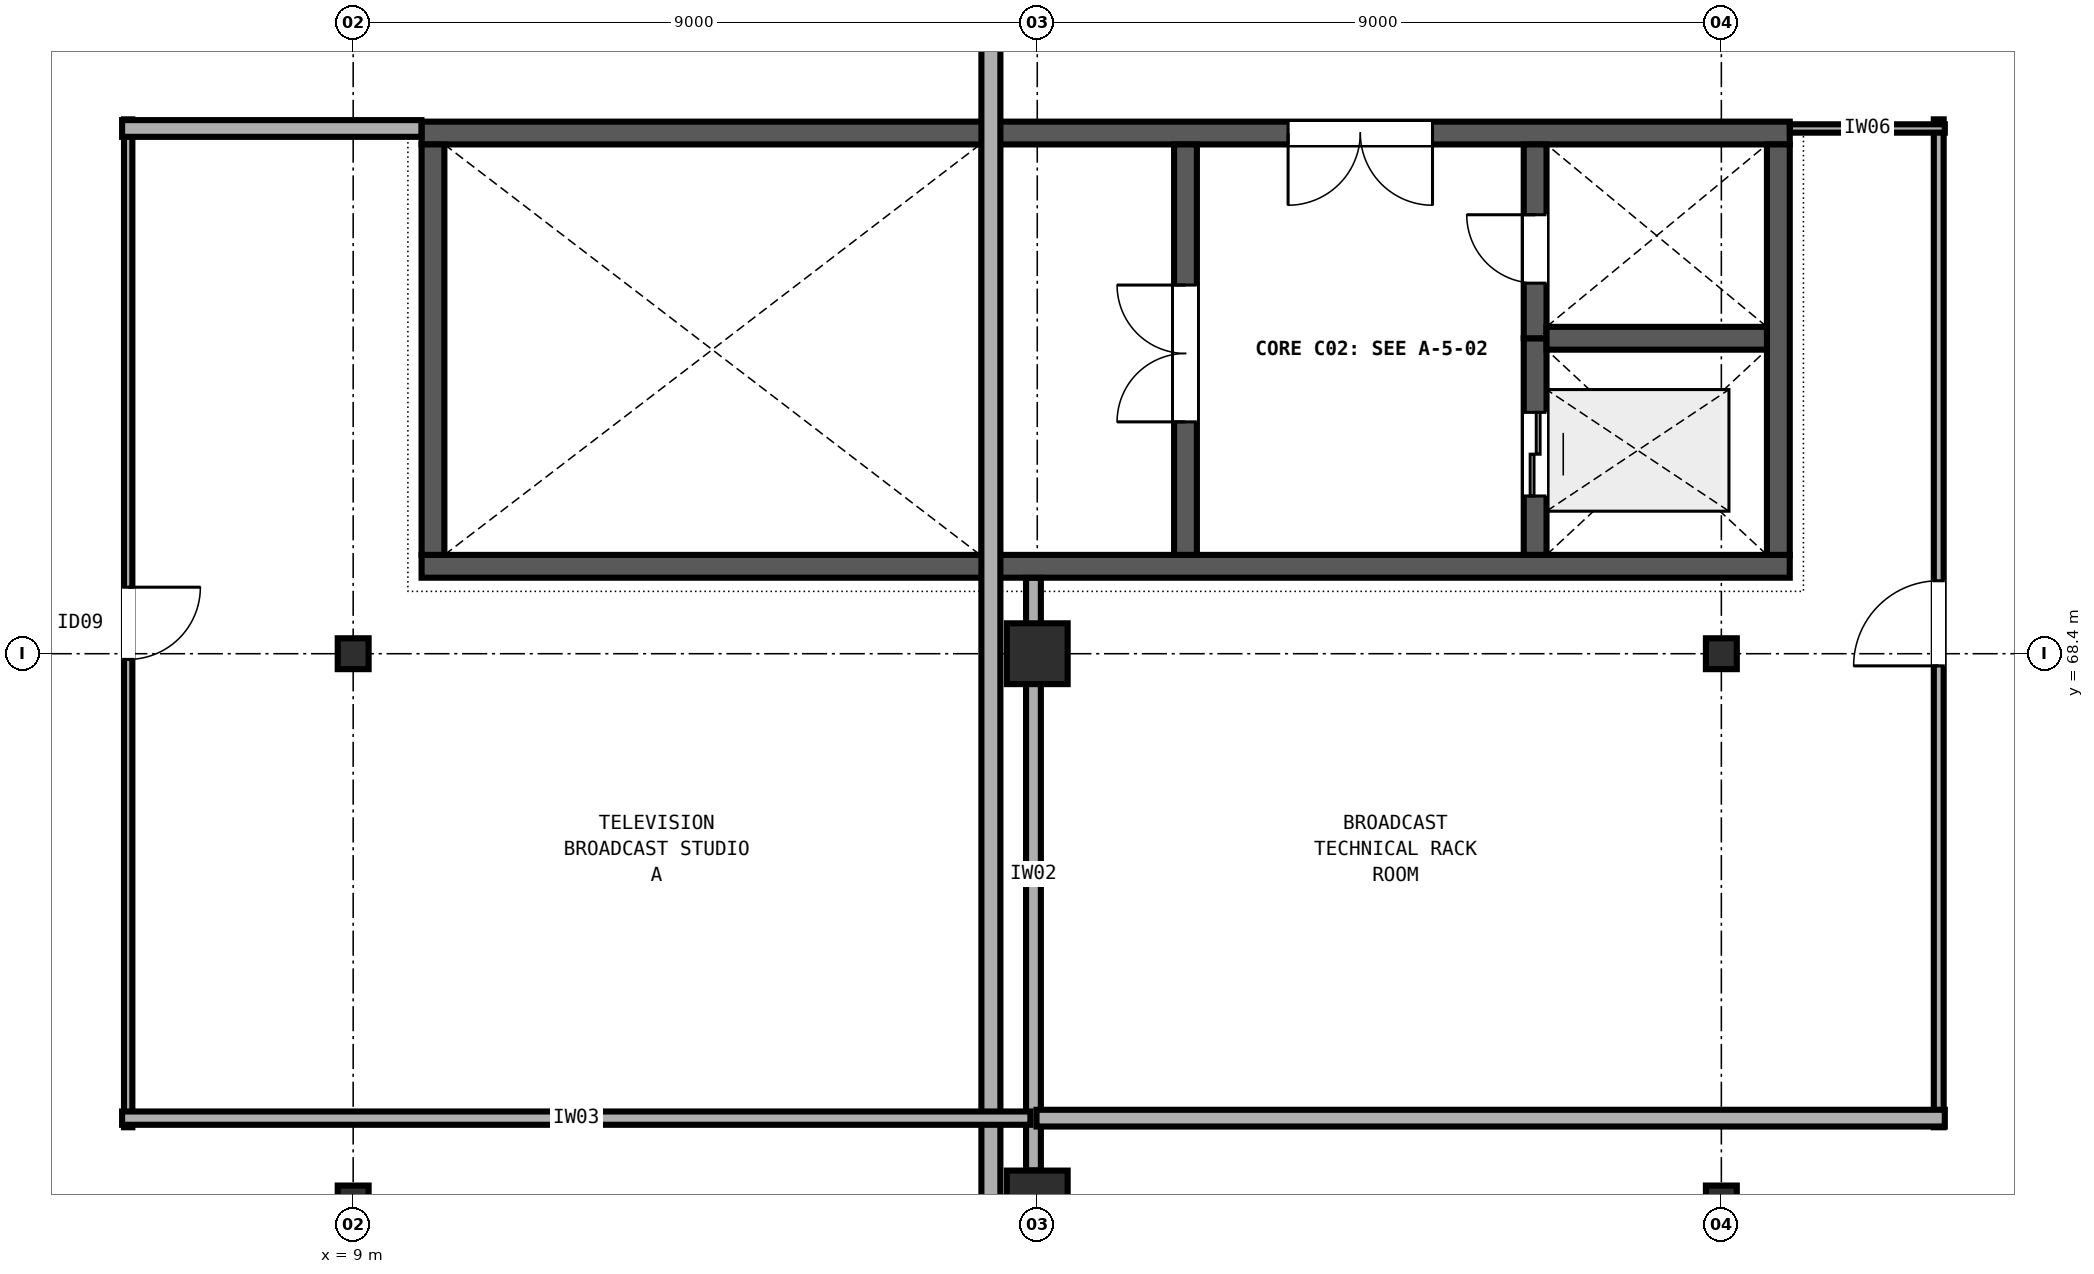
"""IFC4 building model, lengths in metres.
Left out: names, types, materials, properties, quantities, classifications, styles, units other than length and angle.
Written with IfcOpenShell. Run it as: python <this file> out.ifc"""

import sys

from ifc_helpers import new_model, si_unit, direction, frame, frame_2d, origin, origin_2d, place, context, subcontext, project, spatial, rectangle, hollow_circle, extrude, element, fill, save


model = new_model("IFC4")
c1 = context("Model", 3, precision=1e-05, world=origin(), true_north=direction((0.0, 1.0)))
c2 = subcontext(c1, "Body", "Model", "MODEL_VIEW")
j1 = project(units=[si_unit("LENGTHUNIT", "METRE"), si_unit("PLANEANGLEUNIT", "RADIAN")], contexts=[c1])
p1 = place(None, origin())
s1 = spatial("IfcSite", under=j1, at=p1, CompositionType="ELEMENT")
p2 = place(p1, origin())
s2 = spatial("IfcBuilding", under=s1, at=p2, CompositionType="ELEMENT")
p3 = place(p2, frame((0.0, 0.0, 24.0)))
s3 = spatial("IfcBuildingStorey", under=s2, at=p3, CompositionType="ELEMENT", Elevation=24.0)
for number, where, z_axis, x_axis in (
    (1, (9.0, 61.2, 0.0), (0.0, 0.0, 1.0), (1.0, 0.0, 0.0)),
    (2, (9.0, 68.4, 0.0), (0.0, 0.0, 1.0), (1.0, 0.0, 0.0)),
):
    element("IfcColumn", number, at=place(p3, frame(where, z_axis=z_axis, x_axis=x_axis)), inside=s3, PredefinedType="COLUMN", context=c2, shape_type="SweptSolid", body=[
        extrude(hollow_circle(Radius=0.203, WallThickness=0.014, at=origin_2d()), origin(), (0.0, 0.0, 1.0), 4.8),
    ])
for number, where, z_axis, x_axis in (
    (3, (18.0, 61.2, 0.0), (0.0, 0.0, 1.0), (1.0, 0.0, 0.0)),
    (4, (18.0, 68.4, 0.0), (0.0, 0.0, 1.0), (1.0, 0.0, 0.0)),
):
    element("IfcColumn", number, at=place(p3, frame(where, z_axis=z_axis, x_axis=x_axis)), inside=s3, PredefinedType="COLUMN", context=c2, shape_type="SweptSolid", body=[
        extrude(rectangle(XDim=0.8, YDim=0.8, at=origin_2d()), origin(), (0.0, 0.0, 1.0), 4.8),
    ])
for number, where, z_axis, x_axis in (
    (5, (27.0, 61.2, 0.0), (0.0, 0.0, 1.0), (1.0, 0.0, 0.0)),
    (6, (27.0, 68.4, 0.0), (0.0, 0.0, 1.0), (1.0, 0.0, 0.0)),
):
    element("IfcColumn", number, at=place(p3, frame(where, z_axis=z_axis, x_axis=x_axis)), inside=s3, PredefinedType="COLUMN", context=c2, shape_type="SweptSolid", body=[
        extrude(hollow_circle(Radius=0.203, WallThickness=0.014, at=origin_2d()), origin(), (0.0, 0.0, 1.0), 4.8),
    ])
p4 = place(p3, frame((9.9, 69.55, 0.0), z_axis=(0.0, 0.0, 1.0), x_axis=(1.0, 0.0, 0.0)))
e7 = element("IfcWall", 7, at=p4, inside=s3, PredefinedType="SHEAR", context=c2, shape_type="SweptSolid", body=[
    extrude(rectangle(XDim=18.0, YDim=0.3, at=frame_2d((9.0, 0.0))), origin(), (0.0, 0.0, 1.0), 4.56),
])
p5 = place(p3, frame((27.9, 75.25, 0.0), z_axis=(0.0, 0.0, 1.0), x_axis=(-1.0, 0.0, 0.0)))
e8 = element("IfcWall", 8, at=p5, inside=s3, PredefinedType="SHEAR", context=c2, shape_type="SweptSolid", body=[
    extrude(rectangle(XDim=18.0, YDim=0.3, at=frame_2d((9.0, 0.0))), origin(), (0.0, 0.0, 1.0), 4.56),
])
p6 = place(p5, frame((4.7, 0.0, 0.0)))
e9 = element("IfcOpeningElement", 9, at=p6, cuts=e8, PredefinedType="OPENING", context=c2, shape_type="SweptSolid", body=[
    extrude(rectangle(XDim=1.9, YDim=2.25, at=frame_2d((0.95, 1.125))), frame((0.0, 0.16, 0.0), z_axis=(0.0, -1.0, 0.0), x_axis=(1.0, 0.0, 0.0)), (0.0, 0.0, 1.0), 0.32),
])
for number, where, z_axis, x_axis in (
    (10, (10.05, 75.1, 0.0), (0.0, 0.0, 1.0), (0.0, -1.0, 0.0)),
    (11, (27.75, 69.7, 0.0), (0.0, 0.0, 1.0), (0.0, 1.0, 0.0)),
):
    element("IfcWall", number, at=place(p3, frame(where, z_axis=z_axis, x_axis=x_axis)), inside=s3, PredefinedType="SHEAR", context=c2, shape_type="SweptSolid", body=[
        extrude(rectangle(XDim=5.4, YDim=0.3, at=frame_2d((2.7, 0.0))), origin(), (0.0, 0.0, 1.0), 4.56),
    ])
p7 = place(p3, frame((19.95, 69.7, 0.0), z_axis=(0.0, 0.0, 1.0), x_axis=(0.0, 1.0, 0.0)))
e12 = element("IfcWall", 12, at=p7, inside=s3, PredefinedType="SHEAR", context=c2, shape_type="SweptSolid", body=[
    extrude(rectangle(XDim=5.4, YDim=0.3, at=frame_2d((2.7, 0.0))), origin(), (0.0, 0.0, 1.0), 4.56),
])
p8 = place(p7, frame((1.75, 0.0, 0.0)))
e13 = element("IfcOpeningElement", 13, at=p8, cuts=e12, PredefinedType="OPENING", context=c2, shape_type="SweptSolid", body=[
    extrude(rectangle(XDim=1.8, YDim=2.25, at=frame_2d((0.9, 1.125))), frame((0.0, 0.16, 0.0), z_axis=(0.0, -1.0, 0.0), x_axis=(1.0, 0.0, 0.0)), (0.0, 0.0, 1.0), 0.32),
])
p9 = place(p3, frame((24.55, 69.7, 0.0), z_axis=(0.0, 0.0, 1.0), x_axis=(0.0, 1.0, 0.0)))
e14 = element("IfcWall", 14, at=p9, inside=s3, PredefinedType="SHEAR", context=c2, shape_type="SweptSolid", body=[
    extrude(rectangle(XDim=2.85, YDim=0.3, at=frame_2d((1.425, 0.0))), origin(), (0.0, 0.0, 1.0), 4.56),
])
p10 = place(p9, frame((0.775, 0.0, 0.0)))
e15 = element("IfcOpeningElement", 15, at=p10, cuts=e14, PredefinedType="OPENING", context=c2, shape_type="SweptSolid", body=[
    extrude(rectangle(XDim=1.1, YDim=2.1, at=frame_2d((0.55, 1.05))), frame((0.0, 0.16, 0.0), z_axis=(0.0, -1.0, 0.0), x_axis=(1.0, 0.0, 0.0)), (0.0, 0.0, 1.0), 0.32),
])
p11 = place(p3, frame((24.55, 72.55, 0.0), z_axis=(0.0, 0.0, 1.0), x_axis=(0.0, 1.0, 0.0)))
e16 = element("IfcWall", 16, at=p11, inside=s3, PredefinedType="SHEAR", context=c2, shape_type="SweptSolid", body=[
    extrude(rectangle(XDim=2.55, YDim=0.3, at=frame_2d((1.275, 0.0))), origin(), (0.0, 0.0, 1.0), 4.56),
])
p12 = place(p11, frame((0.725, 0.0, 0.0)))
e17 = element("IfcOpeningElement", 17, at=p12, cuts=e16, PredefinedType="OPENING", context=c2, shape_type="SweptSolid", body=[
    extrude(rectangle(XDim=0.9, YDim=2.1, at=frame_2d((0.45, 1.05))), frame((0.0, 0.16, 0.0), z_axis=(0.0, -1.0, 0.0), x_axis=(1.0, 0.0, 0.0)), (0.0, 0.0, 1.0), 0.32),
])
p13 = place(p3, frame((24.7, 72.55, 0.0), z_axis=(0.0, 0.0, 1.0), x_axis=(1.0, 0.0, 0.0)))
e18 = element("IfcWall", 18, at=p13, inside=s3, PredefinedType="SHEAR", context=c2, shape_type="SweptSolid", body=[
    extrude(rectangle(XDim=2.9, YDim=0.3, at=frame_2d((1.45, 0.0))), origin(), (0.0, 0.0, 1.0), 4.56),
])
p14 = place(p3, frame((17.39, 116.84, 4.8), z_axis=(0.0, 0.0, 1.0), x_axis=(0.0, -1.0, 0.0)))
e19 = element("IfcWall", 19, at=p14, inside=s3, PredefinedType="PARAPET", context=c2, shape_type="SweptSolid", body=[
    extrude(rectangle(XDim=71.68, YDim=0.25, at=frame_2d((35.84, 0.0))), origin(), (0.0, 0.0, 1.0), 0.65),
])
p15 = place(p3, frame((6.04, 75.43, 0.0), z_axis=(0.0, 0.0, 1.0), x_axis=(0.0, -1.0, 0.0)))
e20 = element("IfcWall", 20, at=p15, inside=s3, PredefinedType="PARTITIONING", context=c2, shape_type="SweptSolid", body=[
    extrude(rectangle(XDim=13.26, YDim=0.11, at=frame_2d((6.63, 0.0))), origin(), (0.0, 0.0, 1.0), 3.56),
])
p16 = place(p15, frame((6.155, 0.0, 0.0)))
e21 = element("IfcOpeningElement", 21, at=p16, cuts=e20, PredefinedType="OPENING", context=c2, shape_type="SweptSolid", body=[
    extrude(rectangle(XDim=0.95, YDim=2.1, at=frame_2d((0.475, 1.05))), frame((0.0, 0.065, 0.0), z_axis=(0.0, -1.0, 0.0), x_axis=(1.0, 0.0, 0.0)), (0.0, 0.0, 1.0), 0.13),
])
p17 = place(p3, frame((5.96, 75.31, 0.0), z_axis=(0.0, 0.0, 1.0), x_axis=(1.0, 0.0, 0.0)))
e22 = element("IfcWall", 22, at=p17, inside=s3, PredefinedType="PARTITIONING", context=c2, shape_type="SweptSolid", body=[
    extrude(rectangle(XDim=3.938, YDim=0.22, at=frame_2d((1.969, 0.0))), origin(), (0.0, 0.0, 1.0), 3.56),
])
p18 = place(p3, frame((17.95, 69.398, 0.0), z_axis=(0.0, 0.0, 1.0), x_axis=(0.0, -1.0, 0.0)))
e23 = element("IfcWall", 23, at=p18, inside=s3, PredefinedType="PARTITIONING", context=c2, shape_type="SweptSolid", body=[
    extrude(rectangle(XDim=7.796, YDim=0.195, at=frame_2d((3.898, 0.0))), origin(), (0.0, 0.0, 1.0), 3.56),
])
p19 = place(p3, frame((17.91, 62.29, 0.0), z_axis=(0.0, 0.0, 1.0), x_axis=(-1.0, 0.0, 0.0)))
e24 = element("IfcWall", 24, at=p19, inside=s3, PredefinedType="PARTITIONING", context=c2, shape_type="SweptSolid", body=[
    extrude(rectangle(XDim=11.95, YDim=0.175, at=frame_2d((5.975, 0.0))), origin(), (0.0, 0.0, 1.0), 3.56),
])
p20 = place(p3, frame((29.86, 62.17, 0.0), z_axis=(0.0, 0.0, 1.0), x_axis=(0.0, 1.0, 0.0)))
e25 = element("IfcWall", 25, at=p20, inside=s3, PredefinedType="PARTITIONING", context=c2, shape_type="SweptSolid", body=[
    extrude(rectangle(XDim=13.26, YDim=0.13, at=frame_2d((6.63, 0.0))), origin(), (0.0, 0.0, 1.0), 3.56),
])
p21 = place(p20, frame((6.07, 0.0, 0.0)))
e26 = element("IfcOpeningElement", 26, at=p21, cuts=e25, PredefinedType="OPENING", context=c2, shape_type="SweptSolid", body=[
    extrude(rectangle(XDim=1.12, YDim=2.22, at=frame_2d((0.56, 1.11))), frame((0.0, 0.075, 0.0), z_axis=(0.0, -1.0, 0.0), x_axis=(1.0, 0.0, 0.0)), (0.0, 0.0, 1.0), 0.15),
])
p22 = place(p3, frame((27.902, 75.31, 0.0), z_axis=(0.0, 0.0, 1.0), x_axis=(1.0, 0.0, 0.0)))
e27 = element("IfcWall", 27, at=p22, inside=s3, PredefinedType="PARTITIONING", context=c2, shape_type="SweptSolid", body=[
    extrude(rectangle(XDim=2.038, YDim=0.11, at=frame_2d((1.019, 0.0))), origin(), (0.0, 0.0, 1.0), 3.56),
])
p23 = place(p3, frame((29.94, 62.29, 0.0), z_axis=(0.0, 0.0, 1.0), x_axis=(-1.0, 0.0, 0.0)))
e28 = element("IfcWall", 28, at=p23, inside=s3, PredefinedType="PARTITIONING", context=c2, shape_type="SweptSolid", body=[
    extrude(rectangle(XDim=11.95, YDim=0.22, at=frame_2d((5.975, 0.0))), origin(), (0.0, 0.0, 1.0), 3.56),
])
p24 = place(p8, origin())
e29 = element("IfcDoor", 29, at=p24, inside=s3, OperationType="DOUBLE_DOOR_SINGLE_SWING", PredefinedType="DOOR", context=c2, shape_type="SweptSolid", body=[
    extrude(rectangle(XDim=1.8, YDim=2.25, at=frame_2d((0.9, 1.125))), frame((0.0, 0.025, 0.0), z_axis=(0.0, -1.0, 0.0), x_axis=(1.0, 0.0, 0.0)), (0.0, 0.0, 1.0), 0.05),
])
fill(e13, e29)
p25 = place(p12, origin())
e30 = element("IfcDoor", 30, at=p25, inside=s3, OperationType="SINGLE_SWING_RIGHT", PredefinedType="DOOR", context=c2, shape_type="SweptSolid", body=[
    extrude(rectangle(XDim=0.9, YDim=2.1, at=frame_2d((0.45, 1.05))), frame((0.0, 0.025, 0.0), z_axis=(0.0, -1.0, 0.0), x_axis=(1.0, 0.0, 0.0)), (0.0, 0.0, 1.0), 0.05),
])
fill(e17, e30)
p26 = place(p10, origin())
e31 = element("IfcDoor", 31, at=p26, inside=s3, OperationType="DOUBLE_DOOR_SLIDING", PredefinedType="DOOR", context=c2, shape_type="SweptSolid", body=[
    extrude(rectangle(XDim=1.1, YDim=2.1, at=frame_2d((0.55, 1.05))), frame((0.0, 0.025, 0.0), z_axis=(0.0, -1.0, 0.0), x_axis=(1.0, 0.0, 0.0)), (0.0, 0.0, 1.0), 0.05),
])
fill(e15, e31)
p27 = place(p6, origin())
e32 = element("IfcDoor", 32, at=p27, inside=s3, OperationType="DOUBLE_DOOR_SINGLE_SWING", PredefinedType="DOOR", context=c2, shape_type="SweptSolid", body=[
    extrude(rectangle(XDim=1.9, YDim=2.25, at=frame_2d((0.95, 1.125))), frame((0.0, 0.025, 0.0), z_axis=(0.0, -1.0, 0.0), x_axis=(1.0, 0.0, 0.0)), (0.0, 0.0, 1.0), 0.05),
])
fill(e9, e32)
p28 = place(p16, origin())
e33 = element("IfcDoor", 33, at=p28, inside=s3, OperationType="SINGLE_SWING_LEFT", PredefinedType="DOOR", context=c2, shape_type="SweptSolid", body=[
    extrude(rectangle(XDim=0.95, YDim=2.1, at=frame_2d((0.475, 1.05))), frame((0.0, 0.025, 0.0), z_axis=(0.0, -1.0, 0.0), x_axis=(1.0, 0.0, 0.0)), (0.0, 0.0, 1.0), 0.05),
])
fill(e21, e33)
p29 = place(p21, origin())
e34 = element("IfcDoor", 34, at=p29, inside=s3, OperationType="SINGLE_SWING_LEFT", PredefinedType="DOOR", context=c2, shape_type="SweptSolid", body=[
    extrude(rectangle(XDim=1.12, YDim=2.22, at=frame_2d((0.56, 1.11))), frame((0.0, 0.025, 0.0), z_axis=(0.0, -1.0, 0.0), x_axis=(1.0, 0.0, 0.0)), (0.0, 0.0, 1.0), 0.05),
])
fill(e26, e34)
save(model, sys.argv[1])
